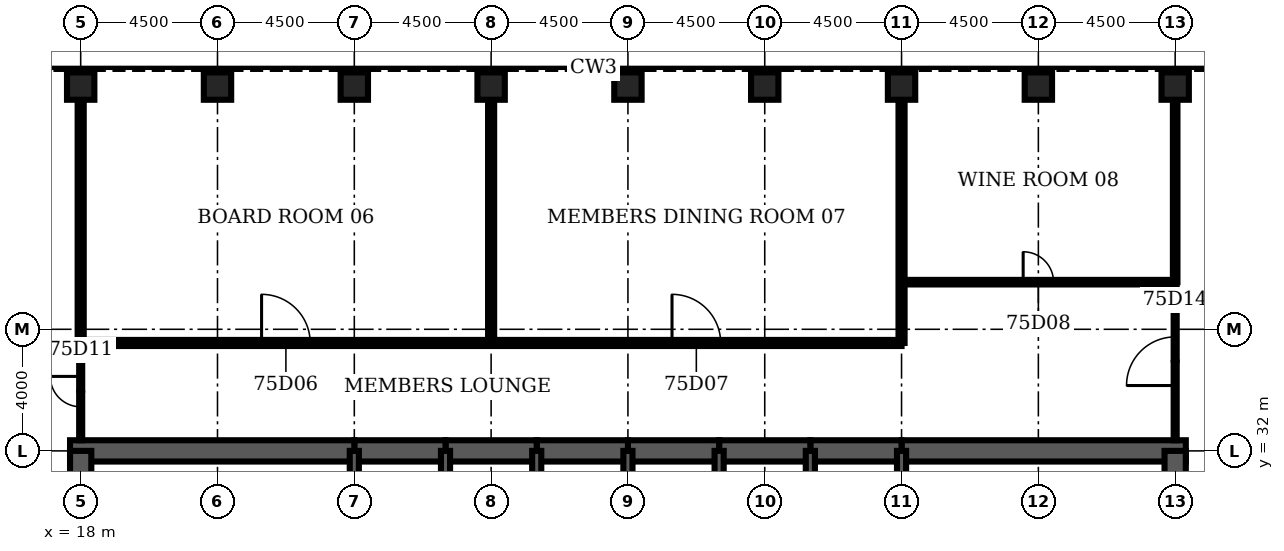
"""IFC4 building model, lengths in metres.
Left out: names, types, materials, properties, quantities, classifications, styles, units other than length and angle.
Written with IfcOpenShell. Run it as: python <this file> out.ifc"""

import sys

from ifc_helpers import new_model, si_unit, direction, frame, frame_2d, origin, origin_2d, place, context, subcontext, project, spatial, rectangle, hollow_rectangle, extrude, element, fill, save


model = new_model("IFC4")
c1 = context("Model", 3, precision=1e-05, world=origin(), true_north=direction((0.0, 1.0)))
c2 = subcontext(c1, "Body", "Model", "MODEL_VIEW")
j1 = project(units=[si_unit("LENGTHUNIT", "METRE"), si_unit("PLANEANGLEUNIT", "RADIAN")], contexts=[c1])
p1 = place(None, origin())
s1 = spatial("IfcSite", under=j1, at=p1, CompositionType="ELEMENT")
p2 = place(p1, origin())
s2 = spatial("IfcBuilding", under=s1, at=p2, CompositionType="ELEMENT")
p3 = place(p2, frame((0.0, 0.0, 329.9)))
s3 = spatial("IfcBuildingStorey", under=s2, at=p3, CompositionType="ELEMENT", Elevation=329.9)
for number, where, z_axis, x_axis in (
    (1, (54.0, 44.0, 0.0), (0.0, 0.0, 1.0), (0.0, 1.0, 0.0)),
    (2, (49.5, 44.0, 0.0), (0.0, 0.0, 1.0), (0.0, 1.0, 0.0)),
    (3, (45.0, 44.0, 0.0), (0.0, 0.0, 1.0), (0.0, 1.0, 0.0)),
    (4, (40.5, 44.0, 0.0), (0.0, 0.0, 1.0), (0.0, 1.0, 0.0)),
    (5, (36.0, 44.0, 0.0), (0.0, 0.0, 1.0), (0.0, 1.0, 0.0)),
    (6, (31.5, 44.0, 0.0), (0.0, 0.0, 1.0), (0.0, 1.0, 0.0)),
    (7, (27.0, 44.0, 0.0), (0.0, 0.0, 1.0), (0.0, 1.0, 0.0)),
    (8, (22.5, 44.0, 0.0), (0.0, 0.0, 1.0), (0.0, 1.0, 0.0)),
    (9, (18.0, 44.0, 0.0), (0.0, 0.0, 1.0), (0.0, 1.0, 0.0)),
):
    element("IfcColumn", number, at=place(p3, frame(where, z_axis=z_axis, x_axis=x_axis)), inside=s3, PredefinedType="COLUMN", context=c2, shape_type="SweptSolid", body=[
        extrude(hollow_rectangle(XDim=0.9, YDim=0.9, WallThickness=0.05, at=origin_2d()), origin(), (0.0, 0.0, 1.0), 4.2),
    ])
p4 = place(p3, frame((54.35, 32.0, 0.0), z_axis=(0.0, 0.0, 1.0), x_axis=(-1.0, 0.0, 0.0)))
e10 = element("IfcWall", 10, at=p4, inside=s3, PredefinedType="SHEAR", context=c2, shape_type="SweptSolid", body=[
    extrude(rectangle(XDim=9.35, YDim=0.7, at=frame_2d((4.675, 0.0))), origin(), (0.0, 0.0, 1.0), 4.2),
])
for number, where, z_axis, x_axis in (
    (11, (45.0, 32.0, 0.0), (0.0, 0.0, 1.0), (-1.0, 0.0, 0.0)),
    (12, (42.0, 32.0, 0.0), (0.0, 0.0, 1.0), (-1.0, 0.0, 0.0)),
    (13, (39.0, 32.0, 0.0), (0.0, 0.0, 1.0), (-1.0, 0.0, 0.0)),
    (14, (36.0, 32.0, 0.0), (0.0, 0.0, 1.0), (-1.0, 0.0, 0.0)),
    (15, (33.0, 32.0, 0.0), (0.0, 0.0, 1.0), (-1.0, 0.0, 0.0)),
    (16, (30.0, 32.0, 0.0), (0.0, 0.0, 1.0), (-1.0, 0.0, 0.0)),
):
    element("IfcWall", number, at=place(p3, frame(where, z_axis=z_axis, x_axis=x_axis)), inside=s3, PredefinedType="SHEAR", context=c2, shape_type="SweptSolid", body=[
        extrude(rectangle(XDim=3.0, YDim=0.7, at=frame_2d((1.5, 0.0))), origin(), (0.0, 0.0, 1.0), 4.2),
    ])
p5 = place(p3, frame((27.0, 32.0, 0.0), z_axis=(0.0, 0.0, 1.0), x_axis=(-1.0, 0.0, 0.0)))
e17 = element("IfcWall", 17, at=p5, inside=s3, PredefinedType="SHEAR", context=c2, shape_type="SweptSolid", body=[
    extrude(rectangle(XDim=9.35, YDim=0.7, at=frame_2d((4.675, 0.0))), origin(), (0.0, 0.0, 1.0), 4.2),
])
for number, where, z_axis, x_axis in (
    (18, (18.0, 32.0, 0.0), (0.0, 0.0, 1.0), (0.0, -1.0, 0.0)),
    (19, (54.0, 28.8, 0.0), (0.0, 0.0, 1.0), (0.0, 1.0, 0.0)),
):
    element("IfcWall", number, at=place(p3, frame(where, z_axis=z_axis, x_axis=x_axis)), inside=s3, PredefinedType="SHEAR", context=c2, shape_type="SweptSolid", body=[
        extrude(rectangle(XDim=3.2, YDim=0.7, at=frame_2d((1.6, 0.0))), origin(), (0.0, 0.0, 1.0), 4.2),
    ])
for number, where, z_axis, x_axis in (
    (20, (27.0, 28.8, 0.0), (0.0, 0.0, 1.0), (0.0, 1.0, 0.0)),
    (21, (30.0, 28.8, 0.0), (0.0, 0.0, 1.0), (0.0, 1.0, 0.0)),
    (22, (33.0, 28.8, 0.0), (0.0, 0.0, 1.0), (0.0, 1.0, 0.0)),
    (23, (36.0, 28.8, 0.0), (0.0, 0.0, 1.0), (0.0, 1.0, 0.0)),
    (24, (39.0, 28.8, 0.0), (0.0, 0.0, 1.0), (0.0, 1.0, 0.0)),
    (25, (42.0, 28.8, 0.0), (0.0, 0.0, 1.0), (0.0, 1.0, 0.0)),
    (26, (45.0, 28.8, 0.0), (0.0, 0.0, 1.0), (0.0, 1.0, 0.0)),
):
    element("IfcWall", number, at=place(p3, frame(where, z_axis=z_axis, x_axis=x_axis)), inside=s3, PredefinedType="SOLIDWALL", context=c2, shape_type="SweptSolid", body=[
        extrude(rectangle(XDim=3.2, YDim=0.3, at=frame_2d((1.6, 0.0))), origin(), (0.0, 0.0, 1.0), 4.2),
    ])
p6 = place(p3, frame((18.0, 35.55, 0.0), z_axis=(0.0, 0.0, 1.0), x_axis=(1.0, 0.0, 0.0)))
e27 = element("IfcWall", 27, at=p6, inside=s3, PredefinedType="PARTITIONING", context=c2, shape_type="SweptSolid", body=[
    extrude(rectangle(XDim=27.0, YDim=0.2, at=frame_2d((13.5, 0.0))), origin(), (0.0, 0.0, 1.0), 3.0),
])
p7 = place(p6, frame((5.95, 0.0, 0.0)))
e28 = element("IfcOpeningElement", 28, at=p7, cuts=e27, PredefinedType="OPENING", context=c2, shape_type="SweptSolid", body=[
    extrude(rectangle(XDim=1.6, YDim=2.1, at=frame_2d((0.8, 1.05))), frame((0.0, 0.11, 0.0), z_axis=(0.0, -1.0, 0.0), x_axis=(1.0, 0.0, 0.0)), (0.0, 0.0, 1.0), 0.22),
])
p8 = place(p6, frame((19.45, 0.0, 0.0)))
e29 = element("IfcOpeningElement", 29, at=p8, cuts=e27, PredefinedType="OPENING", context=c2, shape_type="SweptSolid", body=[
    extrude(rectangle(XDim=1.6, YDim=2.1, at=frame_2d((0.8, 1.05))), frame((0.0, 0.11, 0.0), z_axis=(0.0, -1.0, 0.0), x_axis=(1.0, 0.0, 0.0)), (0.0, 0.0, 1.0), 0.22),
])
p9 = place(p3, frame((45.0, 37.55, 0.0), z_axis=(0.0, 0.0, 1.0), x_axis=(1.0, 0.0, 0.0)))
e30 = element("IfcWall", 30, at=p9, inside=s3, PredefinedType="PARTITIONING", context=c2, shape_type="SweptSolid", body=[
    extrude(rectangle(XDim=9.0, YDim=0.15, at=frame_2d((4.5, 0.0))), origin(), (0.0, 0.0, 1.0), 3.0),
])
p10 = place(p9, frame((4.0, 0.0, 0.0)))
e31 = element("IfcOpeningElement", 31, at=p10, cuts=e30, PredefinedType="OPENING", context=c2, shape_type="SweptSolid", body=[
    extrude(rectangle(XDim=1.0, YDim=2.1, at=frame_2d((0.5, 1.05))), frame((0.0, 0.085, 0.0), z_axis=(0.0, -1.0, 0.0), x_axis=(1.0, 0.0, 0.0)), (0.0, 0.0, 1.0), 0.17),
])
p11 = place(p3, frame((18.0, 32.35, 0.0), z_axis=(0.0, 0.0, 1.0), x_axis=(0.0, 1.0, 0.0)))
e32 = element("IfcWall", 32, at=p11, inside=s3, PredefinedType="PARTITIONING", context=c2, shape_type="SweptSolid", body=[
    extrude(rectangle(XDim=3.2, YDim=0.1, at=frame_2d((1.6, 0.0))), origin(), (0.0, 0.0, 1.0), 3.0),
])
p12 = place(p11, frame((1.1, 0.0, 0.0)))
e33 = element("IfcOpeningElement", 33, at=p12, cuts=e32, PredefinedType="OPENING", context=c2, shape_type="SweptSolid", body=[
    extrude(rectangle(XDim=1.0, YDim=2.1, at=frame_2d((0.5, 1.05))), frame((0.0, 0.06, 0.0), z_axis=(0.0, -1.0, 0.0), x_axis=(1.0, 0.0, 0.0)), (0.0, 0.0, 1.0), 0.12),
])
for number, where, z_axis, x_axis in (
    (34, (18.0, 35.55, 0.0), (0.0, 0.0, 1.0), (0.0, 1.0, 0.0)),
    (35, (31.5, 35.55, 0.0), (0.0, 0.0, 1.0), (0.0, 1.0, 0.0)),
    (36, (45.0, 35.55, 0.0), (0.0, 0.0, 1.0), (0.0, 1.0, 0.0)),
):
    element("IfcWall", number, at=place(p3, frame(where, z_axis=z_axis, x_axis=x_axis)), inside=s3, PredefinedType="PARTITIONING", context=c2, shape_type="SweptSolid", body=[
        extrude(rectangle(XDim=8.0, YDim=0.2, at=frame_2d((4.0, 0.0))), origin(), (0.0, 0.0, 1.0), 3.0),
    ])
p13 = place(p3, frame((54.0, 32.35, 0.0), z_axis=(0.0, 0.0, 1.0), x_axis=(0.0, 1.0, 0.0)))
e37 = element("IfcWall", 37, at=p13, inside=s3, PredefinedType="PARTITIONING", context=c2, shape_type="SweptSolid", body=[
    extrude(rectangle(XDim=5.2, YDim=0.1, at=frame_2d((2.6, 0.0))), origin(), (0.0, 0.0, 1.0), 3.0),
])
p14 = place(p13, frame((1.8, 0.0, 0.0)))
e38 = element("IfcOpeningElement", 38, at=p14, cuts=e37, PredefinedType="OPENING", context=c2, shape_type="SweptSolid", body=[
    extrude(rectangle(XDim=1.6, YDim=2.1, at=frame_2d((0.8, 1.05))), frame((0.0, 0.06, 0.0), z_axis=(0.0, -1.0, 0.0), x_axis=(1.0, 0.0, 0.0)), (0.0, 0.0, 1.0), 0.12),
])
p15 = place(p3, frame((54.0, 37.55, 0.0), z_axis=(0.0, 0.0, 1.0), x_axis=(0.0, 1.0, 0.0)))
e39 = element("IfcWall", 39, at=p15, inside=s3, PredefinedType="PARTITIONING", context=c2, shape_type="SweptSolid", body=[
    extrude(rectangle(XDim=6.0, YDim=0.15, at=frame_2d((3.0, 0.0))), origin(), (0.0, 0.0, 1.0), 3.0),
])
p16 = place(p7, origin())
e40 = element("IfcDoor", 40, at=p16, inside=s3, OperationType="SINGLE_SWING_LEFT", PredefinedType="DOOR", context=c2, shape_type="SweptSolid", body=[
    extrude(rectangle(XDim=1.6, YDim=2.1, at=frame_2d((0.8, 1.05))), frame((0.0, 0.025, 0.0), z_axis=(0.0, -1.0, 0.0), x_axis=(1.0, 0.0, 0.0)), (0.0, 0.0, 1.0), 0.05),
])
fill(e28, e40)
p17 = place(p8, origin())
e41 = element("IfcDoor", 41, at=p17, inside=s3, OperationType="SINGLE_SWING_LEFT", PredefinedType="DOOR", context=c2, shape_type="SweptSolid", body=[
    extrude(rectangle(XDim=1.6, YDim=2.1, at=frame_2d((0.8, 1.05))), frame((0.0, 0.025, 0.0), z_axis=(0.0, -1.0, 0.0), x_axis=(1.0, 0.0, 0.0)), (0.0, 0.0, 1.0), 0.05),
])
fill(e29, e41)
p18 = place(p10, origin())
e42 = element("IfcDoor", 42, at=p18, inside=s3, OperationType="SINGLE_SWING_LEFT", PredefinedType="DOOR", context=c2, shape_type="SweptSolid", body=[
    extrude(rectangle(XDim=1.0, YDim=2.1, at=frame_2d((0.5, 1.05))), frame((0.0, 0.025, 0.0), z_axis=(0.0, -1.0, 0.0), x_axis=(1.0, 0.0, 0.0)), (0.0, 0.0, 1.0), 0.05),
])
fill(e31, e42)
p19 = place(p12, origin())
e43 = element("IfcDoor", 43, at=p19, inside=s3, OperationType="SINGLE_SWING_RIGHT", PredefinedType="DOOR", context=c2, shape_type="SweptSolid", body=[
    extrude(rectangle(XDim=1.0, YDim=2.1, at=frame_2d((0.5, 1.05))), frame((0.0, 0.025, 0.0), z_axis=(0.0, -1.0, 0.0), x_axis=(1.0, 0.0, 0.0)), (0.0, 0.0, 1.0), 0.05),
])
fill(e33, e43)
p20 = place(p14, origin())
e44 = element("IfcDoor", 44, at=p20, inside=s3, OperationType="SINGLE_SWING_LEFT", PredefinedType="DOOR", context=c2, shape_type="SweptSolid", body=[
    extrude(rectangle(XDim=1.6, YDim=2.1, at=frame_2d((0.8, 1.05))), frame((0.0, 0.025, 0.0), z_axis=(0.0, -1.0, 0.0), x_axis=(1.0, 0.0, 0.0)), (0.0, 0.0, 1.0), 0.05),
])
fill(e38, e44)
save(model, sys.argv[1])
